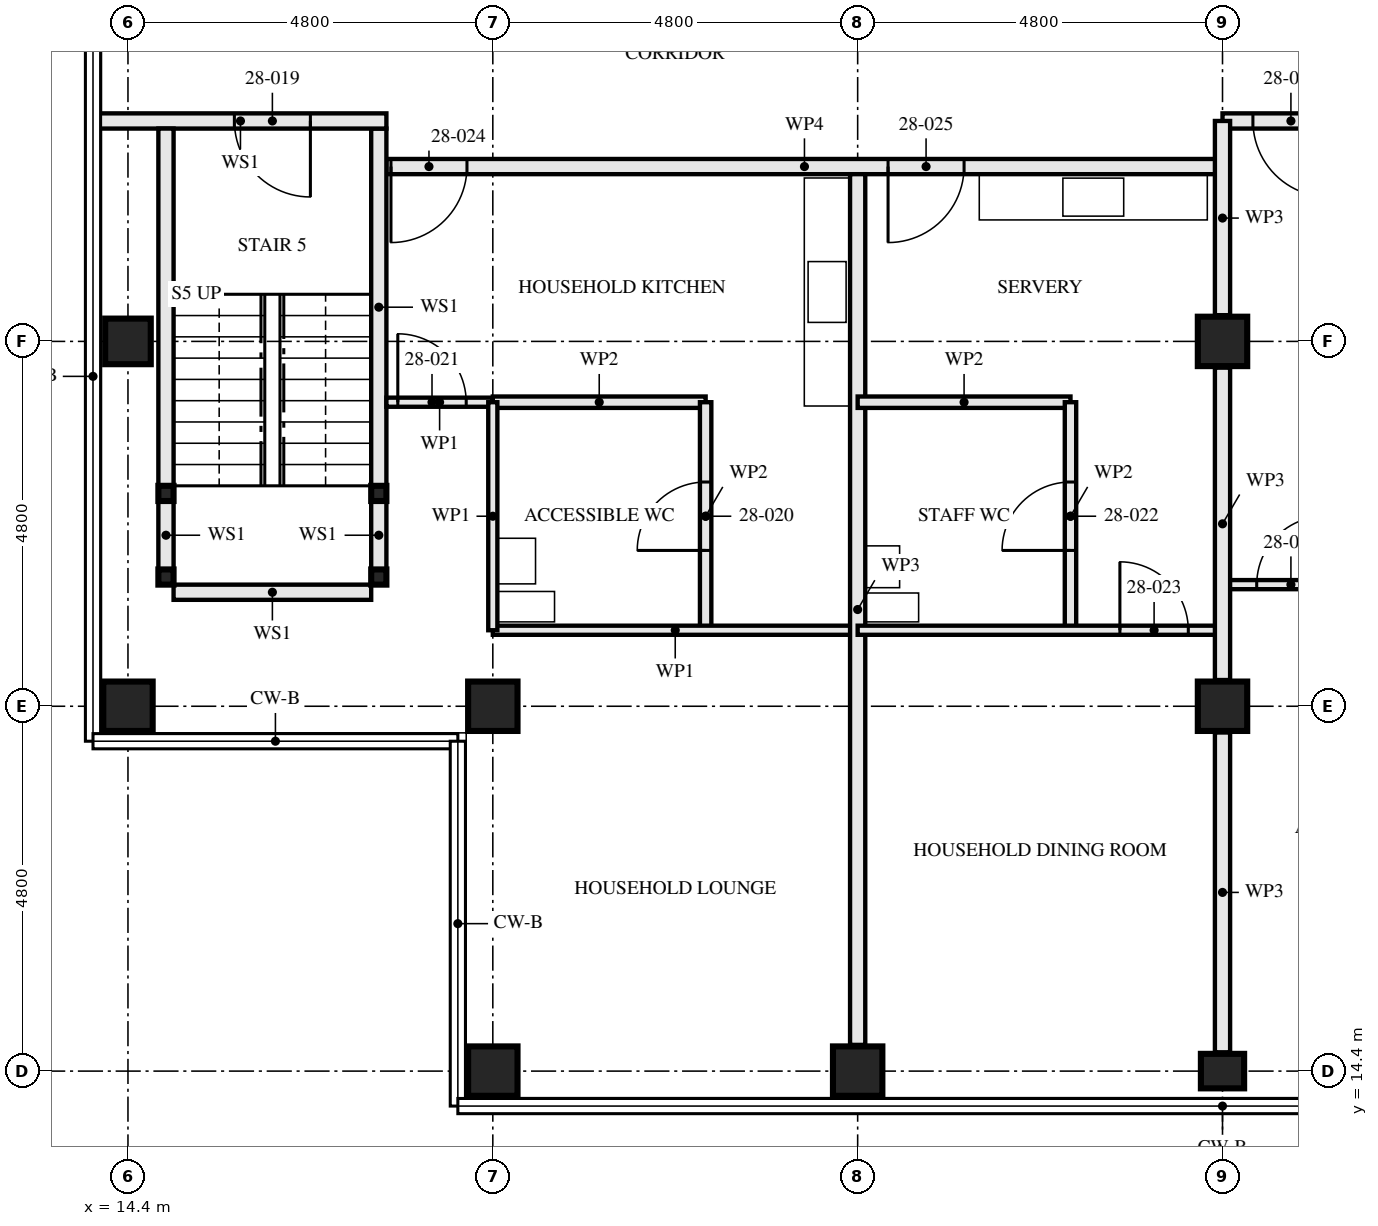
"""IFC4 building model, lengths in metres.
Left out: names, types, materials, properties, quantities, classifications, styles, units other than length and angle.
Written with IfcOpenShell. Run it as: python <this file> out.ifc"""

import sys

from ifc_helpers import new_model, si_unit, direction, frame, frame_2d, origin, origin_2d, place, context, subcontext, project, spatial, rectangle, hollow_rectangle, i_section, extrude, element, fill, save


model = new_model("IFC4")
c1 = context("Model", 3, precision=1e-05, world=origin(), true_north=direction((0.0, 1.0)))
c2 = subcontext(c1, "Body", "Model", "MODEL_VIEW")
j1 = project(units=[si_unit("LENGTHUNIT", "METRE"), si_unit("PLANEANGLEUNIT", "RADIAN")], contexts=[c1])
p1 = place(None, origin())
s1 = spatial("IfcSite", under=j1, at=p1, CompositionType="ELEMENT")
p2 = place(p1, origin())
s2 = spatial("IfcBuilding", under=s1, at=p2, CompositionType="ELEMENT")
p3 = place(p2, frame((0.0, 0.0, 105.0)))
s3 = spatial("IfcBuildingStorey", under=s2, at=p3, CompositionType="ELEMENT", Elevation=105.0)
p4 = place(p3, frame((14.4, 19.2, 0.0), z_axis=(0.0, 0.0, 1.0), x_axis=(0.0, 1.0, 0.0)))
e1 = element("IfcColumn", 1, at=p4, inside=s3, PredefinedType="COLUMN", context=c2, shape_type="SweptSolid", body=[
    extrude(hollow_rectangle(XDim=0.65, YDim=0.65, WallThickness=0.08, at=origin_2d()), origin(), (0.0, 0.0, 1.0), 3.5),
])
p5 = place(p3, frame((14.4, 24.0, 0.0), z_axis=(0.0, 0.0, 1.0), x_axis=(1.0, 0.0, 0.0)))
e2 = element("IfcColumn", 2, at=p5, inside=s3, PredefinedType="COLUMN", context=c2, shape_type="SweptSolid", body=[
    extrude(hollow_rectangle(XDim=0.6, YDim=0.6, WallThickness=0.08, at=origin_2d()), origin(), (0.0, 0.0, 1.0), 3.5),
])
for number, where, z_axis, x_axis in (
    (3, (19.2, 14.4, 0.0), (0.0, 0.0, 1.0), (0.0, 1.0, 0.0)),
    (4, (19.2, 19.2, 0.0), (0.0, 0.0, 1.0), (0.0, 1.0, 0.0)),
    (5, (24.0, 14.4, 0.0), (0.0, 0.0, 1.0), (0.0, 1.0, 0.0)),
):
    element("IfcColumn", number, at=place(p3, frame(where, z_axis=z_axis, x_axis=x_axis)), inside=s3, PredefinedType="COLUMN", context=c2, shape_type="SweptSolid", body=[
        extrude(hollow_rectangle(XDim=0.65, YDim=0.65, WallThickness=0.08, at=origin_2d()), origin(), (0.0, 0.0, 1.0), 3.5),
    ])
p6 = place(p3, frame((28.8, 14.4, 0.0), z_axis=(0.0, 0.0, 1.0), x_axis=(0.0, 1.0, 0.0)))
e6 = element("IfcColumn", 6, at=p6, inside=s3, PredefinedType="COLUMN", context=c2, shape_type="SweptSolid", body=[
    extrude(i_section(OverallWidth=0.454, OverallDepth=0.569, WebThickness=0.078, FlangeThickness=0.125, FilletRadius=0.015, at=origin_2d()), origin(), (0.0, 0.0, 1.0), 3.5),
])
for number, where, z_axis, x_axis in (
    (7, (28.8, 19.2, 0.0), (0.0, 0.0, 1.0), (1.0, 0.0, 0.0)),
    (8, (28.8, 24.0, 0.0), (0.0, 0.0, 1.0), (1.0, 0.0, 0.0)),
):
    element("IfcColumn", number, at=place(p3, frame(where, z_axis=z_axis, x_axis=x_axis)), inside=s3, PredefinedType="COLUMN", context=c2, shape_type="SweptSolid", body=[
        extrude(hollow_rectangle(XDim=0.65, YDim=0.65, WallThickness=0.05, at=origin_2d()), origin(), (0.0, 0.0, 1.0), 3.5),
    ])
for number, where, z_axis, x_axis in (
    (9, (14.9, 20.9, 0.0), (0.0, 0.0, 1.0), (1.0, 0.0, 0.0)),
    (10, (17.7, 20.9, 0.0), (0.0, 0.0, 1.0), (1.0, 0.0, 0.0)),
    (11, (14.9, 22.0, 0.0), (0.0, 0.0, 1.0), (1.0, 0.0, 0.0)),
    (12, (17.7, 22.0, 0.0), (0.0, 0.0, 1.0), (1.0, 0.0, 0.0)),
):
    element("IfcColumn", number, at=place(p3, frame(where, z_axis=z_axis, x_axis=x_axis)), inside=s3, PredefinedType="COLUMN", context=c2, shape_type="SweptSolid", body=[
        extrude(hollow_rectangle(XDim=0.2, YDim=0.2, WallThickness=0.008, at=origin_2d()), origin(), (0.0, 0.0, 1.0), 3.33),
    ])
p7 = place(p3, frame((14.9, 21.0, 0.0), z_axis=(0.0, 0.0, 1.0), x_axis=(0.0, 1.0, 0.0)))
e13 = element("IfcWall", 13, at=p7, inside=s3, PredefinedType="SOLIDWALL", context=c2, shape_type="SweptSolid", body=[
    extrude(rectangle(XDim=0.9, YDim=0.2, at=frame_2d((0.45, 0.0))), origin(), (0.0, 0.0, 1.0), 2.99),
])
p8 = place(p3, frame((14.9, 22.1, 0.0), z_axis=(0.0, 0.0, 1.0), x_axis=(0.0, 1.0, 0.0)))
e14 = element("IfcWall", 14, at=p8, inside=s3, PredefinedType="SOLIDWALL", context=c2, shape_type="SweptSolid", body=[
    extrude(rectangle(XDim=4.7, YDim=0.2, at=frame_2d((2.35, 0.0))), origin(), (0.0, 0.0, 1.0), 2.99),
])
p9 = place(p3, frame((17.7, 21.0, 0.0), z_axis=(0.0, 0.0, 1.0), x_axis=(0.0, 1.0, 0.0)))
e15 = element("IfcWall", 15, at=p9, inside=s3, PredefinedType="SOLIDWALL", context=c2, shape_type="SweptSolid", body=[
    extrude(rectangle(XDim=0.9, YDim=0.2, at=frame_2d((0.45, 0.0))), origin(), (0.0, 0.0, 1.0), 2.99),
])
p10 = place(p3, frame((17.7, 22.1, 0.0), z_axis=(0.0, 0.0, 1.0), x_axis=(0.0, 1.0, 0.0)))
e16 = element("IfcWall", 16, at=p10, inside=s3, PredefinedType="SOLIDWALL", context=c2, shape_type="SweptSolid", body=[
    extrude(rectangle(XDim=4.7, YDim=0.2, at=frame_2d((2.35, 0.0))), origin(), (0.0, 0.0, 1.0), 2.99),
])
p11 = place(p3, frame((15.0, 20.7, 0.0), z_axis=(0.0, 0.0, 1.0), x_axis=(1.0, 0.0, 0.0)))
e17 = element("IfcWall", 17, at=p11, inside=s3, PredefinedType="SOLIDWALL", context=c2, shape_type="SweptSolid", body=[
    extrude(rectangle(XDim=2.6, YDim=0.2, at=frame_2d((1.3, 0.0))), origin(), (0.0, 0.0, 1.0), 3.33),
])
p12 = place(p3, frame((13.96, 26.9, 0.0), z_axis=(0.0, 0.0, 1.0), x_axis=(1.0, 0.0, 0.0)))
e18 = element("IfcWall", 18, at=p12, inside=s3, PredefinedType="SOLIDWALL", context=c2, shape_type="SweptSolid", body=[
    extrude(rectangle(XDim=3.84, YDim=0.2, at=frame_2d((1.92, 0.0))), origin(), (0.0, 0.0, 1.0), 2.32),
])
p13 = place(p12, frame((1.84, 0.0, 0.0)))
e19 = element("IfcOpeningElement", 19, at=p13, cuts=e18, PredefinedType="OPENING", context=c2, shape_type="SweptSolid", body=[
    extrude(rectangle(XDim=1.0, YDim=2.1, at=frame_2d((0.5, 1.05))), frame((0.0, 0.111, 0.0), z_axis=(0.0, -1.0, 0.0), x_axis=(1.0, 0.0, 0.0)), (0.0, 0.0, 1.0), 0.221),
])
p14 = place(p3, frame((22.0, 20.2, 0.0), z_axis=(0.0, 0.0, 1.0), x_axis=(0.0, 1.0, 0.0)))
e20 = element("IfcWall", 20, at=p14, inside=s3, PredefinedType="PARTITIONING", context=c2, shape_type="SweptSolid", body=[
    extrude(rectangle(XDim=3.0, YDim=0.15, at=frame_2d((1.5, 0.0))), origin(), (0.0, 0.0, 1.0), 3.33),
])
p15 = place(p14, frame((1.05, 0.0, 0.0)))
e21 = element("IfcOpeningElement", 21, at=p15, cuts=e20, PredefinedType="OPENING", context=c2, shape_type="SweptSolid", body=[
    extrude(rectangle(XDim=0.9, YDim=2.1, at=frame_2d((0.45, 1.05))), frame((0.0, 0.085, 0.0), z_axis=(0.0, -1.0, 0.0), x_axis=(1.0, 0.0, 0.0)), (0.0, 0.0, 1.0), 0.171),
])
p16 = place(p3, frame((19.2, 23.2, 0.0), z_axis=(0.0, 0.0, 1.0), x_axis=(1.0, 0.0, 0.0)))
e22 = element("IfcWall", 22, at=p16, inside=s3, PredefinedType="PARTITIONING", context=c2, shape_type="SweptSolid", body=[
    extrude(rectangle(XDim=2.8, YDim=0.15, at=frame_2d((1.4, 0.0))), origin(), (0.0, 0.0, 1.0), 3.33),
])
p17 = place(p3, frame((17.8, 23.2, 0.0), z_axis=(0.0, 0.0, 1.0), x_axis=(1.0, 0.0, 0.0)))
e23 = element("IfcWall", 23, at=p17, inside=s3, PredefinedType="PARTITIONING", context=c2, shape_type="SweptSolid", body=[
    extrude(rectangle(XDim=1.4, YDim=0.12, at=frame_2d((0.7, 0.0))), origin(), (0.0, 0.0, 1.0), 3.33),
])
p18 = place(p17, frame((0.15, 0.0, 0.0)))
e24 = element("IfcOpeningElement", 24, at=p18, cuts=e23, PredefinedType="OPENING", context=c2, shape_type="SweptSolid", body=[
    extrude(rectangle(XDim=0.9, YDim=2.1, at=frame_2d((0.45, 1.05))), frame((0.0, 0.071, 0.0), z_axis=(0.0, -1.0, 0.0), x_axis=(1.0, 0.0, 0.0)), (0.0, 0.0, 1.0), 0.141),
])
p19 = place(p3, frame((19.2, 20.2, 0.0), z_axis=(0.0, 0.0, 1.0), x_axis=(1.0, 0.0, 0.0)))
e25 = element("IfcWall", 25, at=p19, inside=s3, PredefinedType="PARTITIONING", context=c2, shape_type="SweptSolid", body=[
    extrude(rectangle(XDim=4.8, YDim=0.12, at=frame_2d((2.4, 0.0))), origin(), (0.0, 0.0, 1.0), 3.33),
])
p20 = place(p3, frame((19.2, 20.2, 0.0), z_axis=(0.0, 0.0, 1.0), x_axis=(0.0, 1.0, 0.0)))
e26 = element("IfcWall", 26, at=p20, inside=s3, PredefinedType="PARTITIONING", context=c2, shape_type="SweptSolid", body=[
    extrude(rectangle(XDim=3.0, YDim=0.12, at=frame_2d((1.5, 0.0))), origin(), (0.0, 0.0, 1.0), 2.55),
])
p21 = place(p3, frame((24.0, 14.745, 0.0), z_axis=(0.0, 0.0, 1.0), x_axis=(0.0, 1.0, 0.0)))
e27 = element("IfcWall", 27, at=p21, inside=s3, PredefinedType="PARTITIONING", context=c2, shape_type="SweptSolid", body=[
    extrude(rectangle(XDim=11.455, YDim=0.2, at=frame_2d((5.728, 0.0))), origin(), (0.0, 0.0, 1.0), 2.55),
])
p22 = place(p3, frame((26.8, 20.2, 0.0), z_axis=(0.0, 0.0, 1.0), x_axis=(0.0, 1.0, 0.0)))
e28 = element("IfcWall", 28, at=p22, inside=s3, PredefinedType="PARTITIONING", context=c2, shape_type="SweptSolid", body=[
    extrude(rectangle(XDim=3.0, YDim=0.15, at=frame_2d((1.5, 0.0))), origin(), (0.0, 0.0, 1.0), 3.33),
])
p23 = place(p22, frame((1.05, 0.0, 0.0)))
e29 = element("IfcOpeningElement", 29, at=p23, cuts=e28, PredefinedType="OPENING", context=c2, shape_type="SweptSolid", body=[
    extrude(rectangle(XDim=0.9, YDim=2.1, at=frame_2d((0.45, 1.05))), frame((0.0, 0.085, 0.0), z_axis=(0.0, -1.0, 0.0), x_axis=(1.0, 0.0, 0.0)), (0.0, 0.0, 1.0), 0.171),
])
p24 = place(p3, frame((24.0, 23.2, 0.0), z_axis=(0.0, 0.0, 1.0), x_axis=(1.0, 0.0, 0.0)))
e30 = element("IfcWall", 30, at=p24, inside=s3, PredefinedType="PARTITIONING", context=c2, shape_type="SweptSolid", body=[
    extrude(rectangle(XDim=2.8, YDim=0.15, at=frame_2d((1.4, 0.0))), origin(), (0.0, 0.0, 1.0), 3.33),
])
p25 = place(p3, frame((24.0, 20.2, 0.0), z_axis=(0.0, 0.0, 1.0), x_axis=(1.0, 0.0, 0.0)))
e31 = element("IfcWall", 31, at=p25, inside=s3, PredefinedType="PARTITIONING", context=c2, shape_type="SweptSolid", body=[
    extrude(rectangle(XDim=4.8, YDim=0.12, at=frame_2d((2.4, 0.0))), origin(), (0.0, 0.0, 1.0), 3.33),
])
p26 = place(p25, frame((3.45, 0.0, 0.0)))
e32 = element("IfcOpeningElement", 32, at=p26, cuts=e31, PredefinedType="OPENING", context=c2, shape_type="SweptSolid", body=[
    extrude(rectangle(XDim=0.9, YDim=2.1, at=frame_2d((0.45, 1.05))), frame((0.0, 0.071, 0.0), z_axis=(0.0, -1.0, 0.0), x_axis=(1.0, 0.0, 0.0)), (0.0, 0.0, 1.0), 0.141),
])
p27 = place(p3, frame((17.8, 26.3, 0.0), z_axis=(0.0, 0.0, 1.0), x_axis=(1.0, 0.0, 0.0)))
e33 = element("IfcWall", 33, at=p27, inside=s3, PredefinedType="PARTITIONING", context=c2, shape_type="SweptSolid", body=[
    extrude(rectangle(XDim=11.0, YDim=0.2, at=frame_2d((5.5, 0.0))), origin(), (0.0, 0.0, 1.0), 2.55),
])
p28 = place(p27, frame((0.06, 0.0, 0.0)))
e34 = element("IfcOpeningElement", 34, at=p28, cuts=e33, PredefinedType="OPENING", context=c2, shape_type="SweptSolid", body=[
    extrude(rectangle(XDim=1.0, YDim=2.1, at=frame_2d((0.5, 1.05))), frame((0.0, 0.111, 0.0), z_axis=(0.0, -1.0, 0.0), x_axis=(1.0, 0.0, 0.0)), (0.0, 0.0, 1.0), 0.221),
])
p29 = place(p27, frame((6.6, 0.0, 0.0)))
e35 = element("IfcOpeningElement", 35, at=p29, cuts=e33, PredefinedType="OPENING", context=c2, shape_type="SweptSolid", body=[
    extrude(rectangle(XDim=1.0, YDim=2.1, at=frame_2d((0.5, 1.05))), frame((0.0, 0.111, 0.0), z_axis=(0.0, -1.0, 0.0), x_axis=(1.0, 0.0, 0.0)), (0.0, 0.0, 1.0), 0.221),
])
p30 = place(p3, frame((28.8, 20.8, 0.0), z_axis=(0.0, 0.0, 1.0), x_axis=(1.0, 0.0, 0.0)))
e36 = element("IfcWall", 36, at=p30, inside=s3, PredefinedType="PARTITIONING", context=c2, shape_type="SweptSolid", body=[
    extrude(rectangle(XDim=4.8, YDim=0.12, at=frame_2d((2.4, 0.0))), origin(), (0.0, 0.0, 1.0), 3.33),
])
p31 = place(p30, frame((0.45, 0.0, 0.0)))
e37 = element("IfcOpeningElement", 37, at=p31, cuts=e36, PredefinedType="OPENING", context=c2, shape_type="SweptSolid", body=[
    extrude(rectangle(XDim=0.9, YDim=2.1, at=frame_2d((0.45, 1.05))), frame((0.0, 0.071, 0.0), z_axis=(0.0, -1.0, 0.0), x_axis=(1.0, 0.0, 0.0)), (0.0, 0.0, 1.0), 0.141),
])
p32 = place(p30, frame((2.925, 0.0, 0.0)))
e38 = element("IfcOpeningElement", 38, at=p32, cuts=e36, PredefinedType="OPENING", context=c2, shape_type="SweptSolid", body=[
    extrude(rectangle(XDim=0.95, YDim=2.1, at=frame_2d((0.475, 1.05))), frame((0.0, 0.071, 0.0), z_axis=(0.0, -1.0, 0.0), x_axis=(1.0, 0.0, 0.0)), (0.0, 0.0, 1.0), 0.141),
])
p33 = place(p3, frame((28.8, 26.9, 0.0), z_axis=(0.0, 0.0, 1.0), x_axis=(1.0, 0.0, 0.0)))
e39 = element("IfcWall", 39, at=p33, inside=s3, PredefinedType="PARTITIONING", context=c2, shape_type="SweptSolid", body=[
    extrude(rectangle(XDim=9.6, YDim=0.2, at=frame_2d((4.8, 0.0))), origin(), (0.0, 0.0, 1.0), 3.33),
])
p34 = place(p33, frame((0.4, 0.0, 0.0)))
e40 = element("IfcOpeningElement", 40, at=p34, cuts=e39, PredefinedType="OPENING", context=c2, shape_type="SweptSolid", body=[
    extrude(rectangle(XDim=1.0, YDim=2.1, at=frame_2d((0.5, 1.05))), frame((0.0, 0.111, 0.0), z_axis=(0.0, -1.0, 0.0), x_axis=(1.0, 0.0, 0.0)), (0.0, 0.0, 1.0), 0.221),
])
p35 = place(p33, frame((5.2, 0.0, 0.0)))
e41 = element("IfcOpeningElement", 41, at=p35, cuts=e39, PredefinedType="OPENING", context=c2, shape_type="SweptSolid", body=[
    extrude(rectangle(XDim=1.0, YDim=2.1, at=frame_2d((0.5, 1.05))), frame((0.0, 0.111, 0.0), z_axis=(0.0, -1.0, 0.0), x_axis=(1.0, 0.0, 0.0)), (0.0, 0.0, 1.0), 0.221),
])
p36 = place(p3, frame((28.8, 14.647, 0.0), z_axis=(0.0, 0.0, 1.0), x_axis=(0.0, 1.0, 0.0)))
e42 = element("IfcWall", 42, at=p36, inside=s3, PredefinedType="PARTITIONING", context=c2, shape_type="SweptSolid", body=[
    extrude(rectangle(XDim=4.208, YDim=0.2, at=frame_2d((2.104, 0.0))), origin(), (0.0, 0.0, 1.0), 2.32),
])
p37 = place(p3, frame((28.8, 19.545, 0.0), z_axis=(0.0, 0.0, 1.0), x_axis=(0.0, 1.0, 0.0)))
e43 = element("IfcWall", 43, at=p37, inside=s3, PredefinedType="PARTITIONING", context=c2, shape_type="SweptSolid", body=[
    extrude(rectangle(XDim=4.11, YDim=0.2, at=frame_2d((2.055, 0.0))), origin(), (0.0, 0.0, 1.0), 2.32),
])
p38 = place(p3, frame((28.8, 24.345, 0.0), z_axis=(0.0, 0.0, 1.0), x_axis=(0.0, 1.0, 0.0)))
e44 = element("IfcWall", 44, at=p38, inside=s3, PredefinedType="PARTITIONING", context=c2, shape_type="SweptSolid", body=[
    extrude(rectangle(XDim=2.555, YDim=0.2, at=frame_2d((1.277, 0.0))), origin(), (0.0, 0.0, 1.0), 2.32),
])
p39 = place(p13, frame((1.0, 0.0, 0.0), z_axis=(0.0, 0.0, 1.0), x_axis=(-1.0, 0.0, 0.0)))
e45 = element("IfcDoor", 45, at=p39, inside=s3, OperationType="SINGLE_SWING_RIGHT", PredefinedType="DOOR", context=c2, shape_type="SweptSolid", body=[
    extrude(rectangle(XDim=1.0, YDim=2.1, at=frame_2d((0.5, 1.05))), frame((0.0, 0.032, 0.0), z_axis=(0.0, -1.0, 0.0), x_axis=(1.0, 0.0, 0.0)), (0.0, 0.0, 1.0), 0.064),
])
fill(e19, e45)
p40 = place(p15, origin())
e46 = element("IfcDoor", 46, at=p40, inside=s3, OperationType="SINGLE_SWING_RIGHT", PredefinedType="DOOR", context=c2, shape_type="SweptSolid", body=[
    extrude(rectangle(XDim=0.9, YDim=2.1, at=frame_2d((0.45, 1.05))), frame((0.0, 0.022, 0.0), z_axis=(0.0, -1.0, 0.0), x_axis=(1.0, 0.0, 0.0)), (0.0, 0.0, 1.0), 0.044),
])
fill(e21, e46)
p41 = place(p18, origin())
e47 = element("IfcDoor", 47, at=p41, inside=s3, OperationType="SINGLE_SWING_RIGHT", PredefinedType="DOOR", context=c2, shape_type="SweptSolid", body=[
    extrude(rectangle(XDim=0.9, YDim=2.1, at=frame_2d((0.45, 1.05))), frame((0.0, 0.022, 0.0), z_axis=(0.0, -1.0, 0.0), x_axis=(1.0, 0.0, 0.0)), (0.0, 0.0, 1.0), 0.044),
])
fill(e24, e47)
p42 = place(p23, origin())
e48 = element("IfcDoor", 48, at=p42, inside=s3, OperationType="SINGLE_SWING_RIGHT", PredefinedType="DOOR", context=c2, shape_type="SweptSolid", body=[
    extrude(rectangle(XDim=0.9, YDim=2.1, at=frame_2d((0.45, 1.05))), frame((0.0, 0.022, 0.0), z_axis=(0.0, -1.0, 0.0), x_axis=(1.0, 0.0, 0.0)), (0.0, 0.0, 1.0), 0.044),
])
fill(e29, e48)
p43 = place(p26, origin())
e49 = element("IfcDoor", 49, at=p43, inside=s3, OperationType="SINGLE_SWING_RIGHT", PredefinedType="DOOR", context=c2, shape_type="SweptSolid", body=[
    extrude(rectangle(XDim=0.9, YDim=2.1, at=frame_2d((0.45, 1.05))), frame((0.0, 0.022, 0.0), z_axis=(0.0, -1.0, 0.0), x_axis=(1.0, 0.0, 0.0)), (0.0, 0.0, 1.0), 0.044),
])
fill(e32, e49)
p44 = place(p28, frame((1.0, 0.0, 0.0), z_axis=(0.0, 0.0, 1.0), x_axis=(-1.0, 0.0, 0.0)))
e50 = element("IfcDoor", 50, at=p44, inside=s3, OperationType="SINGLE_SWING_LEFT", PredefinedType="DOOR", context=c2, shape_type="SweptSolid", body=[
    extrude(rectangle(XDim=1.0, YDim=2.1, at=frame_2d((0.5, 1.05))), frame((0.0, 0.027, 0.0), z_axis=(0.0, -1.0, 0.0), x_axis=(1.0, 0.0, 0.0)), (0.0, 0.0, 1.0), 0.054),
])
fill(e34, e50)
p45 = place(p29, frame((1.0, 0.0, 0.0), z_axis=(0.0, 0.0, 1.0), x_axis=(-1.0, 0.0, 0.0)))
e51 = element("IfcDoor", 51, at=p45, inside=s3, OperationType="SINGLE_SWING_LEFT", PredefinedType="DOOR", context=c2, shape_type="SweptSolid", body=[
    extrude(rectangle(XDim=1.0, YDim=2.1, at=frame_2d((0.5, 1.05))), frame((0.0, 0.027, 0.0), z_axis=(0.0, -1.0, 0.0), x_axis=(1.0, 0.0, 0.0)), (0.0, 0.0, 1.0), 0.054),
])
fill(e35, e51)
p46 = place(p31, origin())
e52 = element("IfcDoor", 52, at=p46, inside=s3, OperationType="SINGLE_SWING_LEFT", PredefinedType="DOOR", context=c2, shape_type="SweptSolid", body=[
    extrude(rectangle(XDim=0.9, YDim=2.1, at=frame_2d((0.45, 1.05))), frame((0.0, 0.022, 0.0), z_axis=(0.0, -1.0, 0.0), x_axis=(1.0, 0.0, 0.0)), (0.0, 0.0, 1.0), 0.044),
])
fill(e37, e52)
p47 = place(p34, frame((1.0, 0.0, 0.0), z_axis=(0.0, 0.0, 1.0), x_axis=(-1.0, 0.0, 0.0)))
e53 = element("IfcDoor", 53, at=p47, inside=s3, OperationType="SINGLE_SWING_RIGHT", PredefinedType="DOOR", context=c2, shape_type="SweptSolid", body=[
    extrude(rectangle(XDim=1.0, YDim=2.1, at=frame_2d((0.5, 1.05))), frame((0.0, 0.027, 0.0), z_axis=(0.0, -1.0, 0.0), x_axis=(1.0, 0.0, 0.0)), (0.0, 0.0, 1.0), 0.054),
])
fill(e40, e53)
save(model, sys.argv[1])
